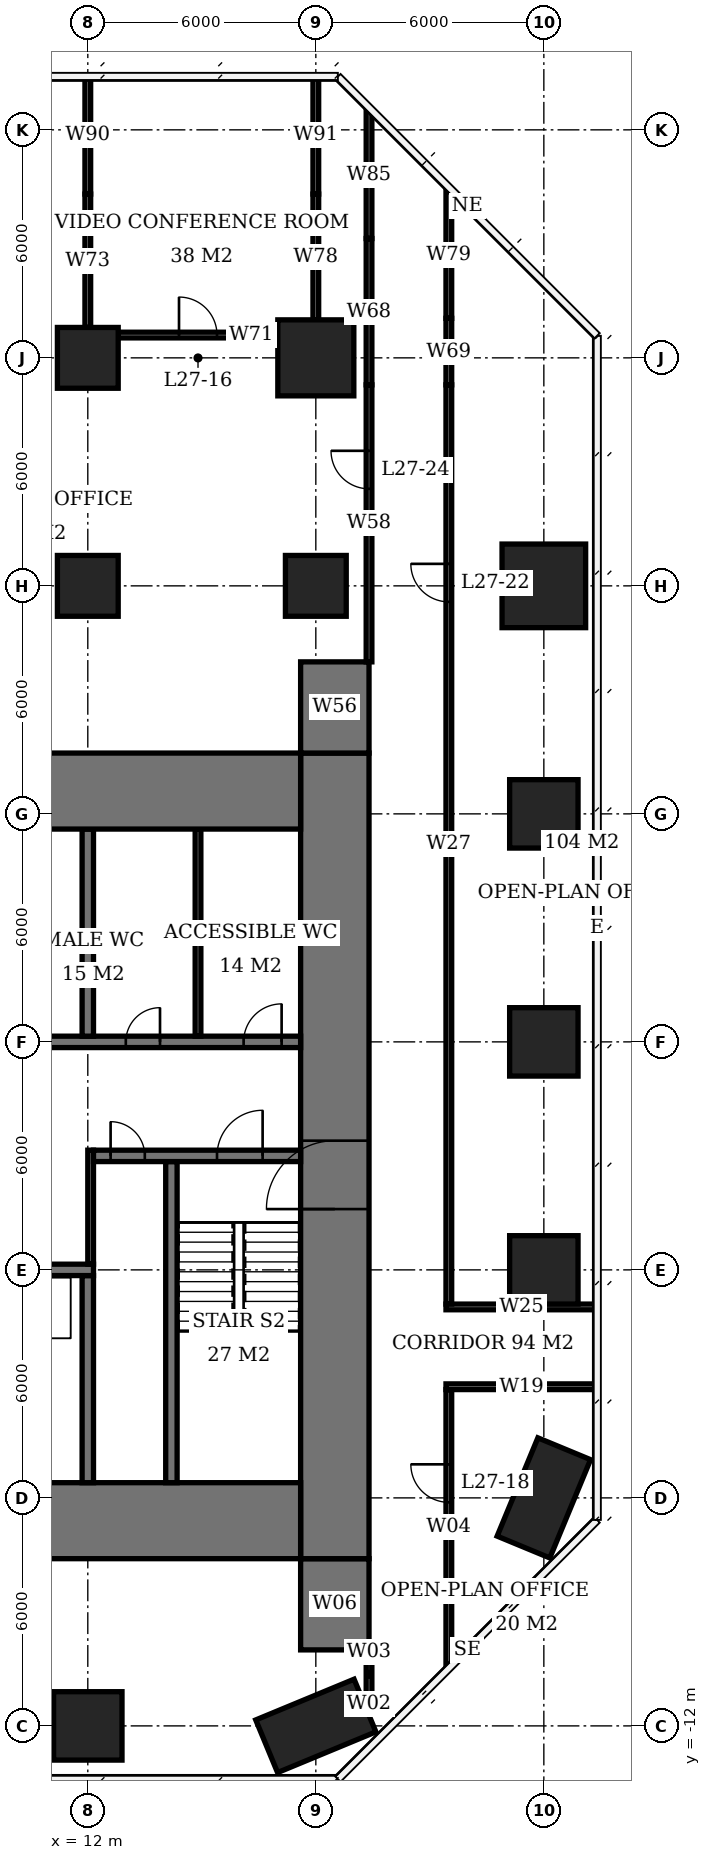
"""IFC4 building model, lengths in metres.
Left out: names, types, materials, properties, quantities, classifications, styles, units other than length and angle.
Written with IfcOpenShell. Run it as: python <this file> out.ifc"""

import sys

from ifc_helpers import new_model, si_unit, direction, frame, frame_2d, origin, origin_2d, place, context, subcontext, project, spatial, rectangle, extrude, element, fill, save


model = new_model("IFC4")
c1 = context("Model", 3, precision=1e-05, world=origin(), true_north=direction((0.0, 1.0)))
c2 = subcontext(c1, "Body", "Model", "MODEL_VIEW")
j1 = project(units=[si_unit("LENGTHUNIT", "METRE"), si_unit("PLANEANGLEUNIT", "RADIAN")], contexts=[c1])
p1 = place(None, origin())
s1 = spatial("IfcSite", under=j1, at=p1, CompositionType="ELEMENT")
p2 = place(p1, origin())
s2 = spatial("IfcBuilding", under=s1, at=p2, CompositionType="ELEMENT")
p3 = place(p2, frame((0.0, 0.0, 113.3)))
s3 = spatial("IfcBuildingStorey", under=s2, at=p3, CompositionType="ELEMENT", Elevation=113.3)
p4 = place(p3, frame((12.0, -12.0, 0.0), z_axis=(0.0, 0.0, 1.0), x_axis=(1.0, 0.0, 0.0)))
e1 = element("IfcColumn", 1, at=p4, inside=s3, PredefinedType="COLUMN", context=c2, shape_type="SweptSolid", body=[
    extrude(rectangle(XDim=1.8, YDim=1.8, at=origin_2d()), origin(), (0.0, 0.0, 1.0), 3.9),
])
for number, where, z_axis, x_axis in (
    (2, (12.0, 18.0, 0.0), (0.0, 0.0, 1.0), (1.0, 0.0, 0.0)),
    (3, (12.0, 24.0, 0.0), (0.0, 0.0, 1.0), (1.0, 0.0, 0.0)),
):
    element("IfcColumn", number, at=place(p3, frame(where, z_axis=z_axis, x_axis=x_axis)), inside=s3, PredefinedType="COLUMN", context=c2, shape_type="SweptSolid", body=[
        extrude(rectangle(XDim=1.6, YDim=1.6, at=origin_2d()), origin(), (0.0, 0.0, 1.0), 3.9),
    ])
p5 = place(p3, frame((18.0, -12.0, 0.0), z_axis=(0.0, 0.0, 1.0), x_axis=(-0.923879532511, -0.382683432365, 0.0)))
e4 = element("IfcColumn", 4, at=p5, inside=s3, PredefinedType="COLUMN", context=c2, shape_type="SweptSolid", body=[
    extrude(rectangle(XDim=2.8, YDim=1.5, at=origin_2d()), origin(), (0.0, 0.0, 1.0), 3.9),
])
p6 = place(p3, frame((18.0, 18.0, 0.0), z_axis=(0.0, 0.0, 1.0), x_axis=(1.0, 0.0, 0.0)))
e5 = element("IfcColumn", 5, at=p6, inside=s3, PredefinedType="COLUMN", context=c2, shape_type="SweptSolid", body=[
    extrude(rectangle(XDim=1.6, YDim=1.6, at=origin_2d()), origin(), (0.0, 0.0, 1.0), 3.9),
])
p7 = place(p3, frame((18.0, 24.0, 0.0), z_axis=(0.0, 0.0, 1.0), x_axis=(1.0, 0.0, 0.0)))
e6 = element("IfcColumn", 6, at=p7, inside=s3, PredefinedType="COLUMN", context=c2, shape_type="SweptSolid", body=[
    extrude(rectangle(XDim=2.0, YDim=2.0, at=origin_2d()), origin(), (0.0, 0.0, 1.0), 3.9),
])
p8 = place(p3, frame((24.0, -6.0, 0.0), z_axis=(0.0, 0.0, 1.0), x_axis=(-0.382683432365, -0.923879532511, 0.0)))
e7 = element("IfcColumn", 7, at=p8, inside=s3, PredefinedType="COLUMN", context=c2, shape_type="SweptSolid", body=[
    extrude(rectangle(XDim=2.8, YDim=1.5, at=origin_2d()), origin(), (0.0, 0.0, 1.0), 3.9),
])
for number, where, z_axis, x_axis in (
    (8, (24.0, 0.0, 0.0), (0.0, 0.0, 1.0), (1.0, 0.0, 0.0)),
    (9, (24.0, 6.0, 0.0), (0.0, 0.0, 1.0), (1.0, 0.0, 0.0)),
    (10, (24.0, 12.0, 0.0), (0.0, 0.0, 1.0), (1.0, 0.0, 0.0)),
):
    element("IfcColumn", number, at=place(p3, frame(where, z_axis=z_axis, x_axis=x_axis)), inside=s3, PredefinedType="COLUMN", context=c2, shape_type="SweptSolid", body=[
        extrude(rectangle(XDim=1.8, YDim=1.8, at=origin_2d()), origin(), (0.0, 0.0, 1.0), 3.9),
    ])
p9 = place(p3, frame((24.0, 18.0, 0.0), z_axis=(0.0, 0.0, 1.0), x_axis=(1.0, 0.0, 0.0)))
e11 = element("IfcColumn", 11, at=p9, inside=s3, PredefinedType="COLUMN", context=c2, shape_type="SweptSolid", body=[
    extrude(rectangle(XDim=2.2, YDim=2.2, at=origin_2d()), origin(), (0.0, 0.0, 1.0), 3.9),
])
for number, where, z_axis, x_axis in (
    (12, (-5.6, -6.6, 0.0), (0.0, 0.0, 1.0), (1.0, 0.0, 0.0)),
    (13, (-5.6, 12.6, 0.0), (0.0, 0.0, 1.0), (1.0, 0.0, 0.0)),
):
    element("IfcWall", number, at=place(p3, frame(where, z_axis=z_axis, x_axis=x_axis)), inside=s3, PredefinedType="SHEAR", context=c2, shape_type="SweptSolid", body=[
        extrude(rectangle(XDim=23.2, YDim=2.0, at=frame_2d((11.6, 0.0))), origin(), (0.0, 0.0, 1.0), 3.9),
    ])
p10 = place(p3, frame((18.5, -7.6, 0.0), z_axis=(0.0, 0.0, 1.0), x_axis=(0.0, 1.0, 0.0)))
e14 = element("IfcWall", 14, at=p10, inside=s3, PredefinedType="SHEAR", context=c2, shape_type="SweptSolid", body=[
    extrude(rectangle(XDim=21.2, YDim=1.8, at=frame_2d((10.6, 0.0))), origin(), (0.0, 0.0, 1.0), 3.9),
])
p11 = place(p10, frame((9.2, 0.0, 0.0)))
e15 = element("IfcOpeningElement", 15, at=p11, cuts=e14, PredefinedType="OPENING", context=c2, shape_type="SweptSolid", body=[
    extrude(rectangle(XDim=1.8, YDim=2.4, at=frame_2d((0.9, 1.2))), frame((0.0, 0.91, 0.0), z_axis=(0.0, -1.0, 0.0), x_axis=(1.0, 0.0, 0.0)), (0.0, 0.0, 1.0), 1.82),
])
for number, where, z_axis, x_axis in (
    (16, (18.5, -10.0, 0.0), (0.0, 0.0, 1.0), (0.0, 1.0, 0.0)),
    (17, (18.5, 13.6, 0.0), (0.0, 0.0, 1.0), (0.0, 1.0, 0.0)),
):
    element("IfcWall", number, at=place(p3, frame(where, z_axis=z_axis, x_axis=x_axis)), inside=s3, PredefinedType="SHEAR", context=c2, shape_type="SweptSolid", body=[
        extrude(rectangle(XDim=2.4, YDim=1.8, at=frame_2d((1.2, 0.0))), origin(), (0.0, 0.0, 1.0), 3.9),
    ])
p12 = place(p3, frame((-5.6, 0.0, 0.0), z_axis=(0.0, 0.0, 1.0), x_axis=(1.0, 0.0, 0.0)))
e18 = element("IfcWall", 18, at=p12, inside=s3, PredefinedType="SHEAR", context=c2, shape_type="SweptSolid", body=[
    extrude(rectangle(XDim=17.75, YDim=0.3, at=frame_2d((8.875, 0.0))), origin(), (0.0, 0.0, 1.0), 3.9),
])
p13 = place(p12, frame((0.6, 0.0, 0.0)))
e19 = element("IfcOpeningElement", 19, at=p13, cuts=e18, PredefinedType="OPENING", context=c2, shape_type="SweptSolid", body=[
    extrude(rectangle(XDim=0.9, YDim=2.1, at=frame_2d((0.45, 1.05))), frame((0.0, 0.16, 0.0), z_axis=(0.0, -1.0, 0.0), x_axis=(1.0, 0.0, 0.0)), (0.0, 0.0, 1.0), 0.32),
])
p14 = place(p12, frame((6.55, 0.0, 0.0)))
e20 = element("IfcOpeningElement", 20, at=p14, cuts=e18, PredefinedType="OPENING", context=c2, shape_type="SweptSolid", body=[
    extrude(rectangle(XDim=1.1, YDim=2.1, at=frame_2d((0.55, 1.05))), frame((0.0, 0.16, 0.0), z_axis=(0.0, -1.0, 0.0), x_axis=(1.0, 0.0, 0.0)), (0.0, 0.0, 1.0), 0.32),
])
p15 = place(p12, frame((9.55, 0.0, 0.0)))
e21 = element("IfcOpeningElement", 21, at=p15, cuts=e18, PredefinedType="OPENING", context=c2, shape_type="SweptSolid", body=[
    extrude(rectangle(XDim=1.1, YDim=2.1, at=frame_2d((0.55, 1.05))), frame((0.0, 0.16, 0.0), z_axis=(0.0, -1.0, 0.0), x_axis=(1.0, 0.0, 0.0)), (0.0, 0.0, 1.0), 0.32),
])
p16 = place(p3, frame((12.15, 3.0, 0.0), z_axis=(0.0, 0.0, 1.0), x_axis=(1.0, 0.0, 0.0)))
e22 = element("IfcWall", 22, at=p16, inside=s3, PredefinedType="SHEAR", context=c2, shape_type="SweptSolid", body=[
    extrude(rectangle(XDim=5.45, YDim=0.3, at=frame_2d((2.725, 0.0))), origin(), (0.0, 0.0, 1.0), 3.9),
])
p17 = place(p16, frame((3.25, 0.0, 0.0)))
e23 = element("IfcOpeningElement", 23, at=p17, cuts=e22, PredefinedType="OPENING", context=c2, shape_type="SweptSolid", body=[
    extrude(rectangle(XDim=1.2, YDim=2.1, at=frame_2d((0.6, 1.05))), frame((0.0, 0.16, 0.0), z_axis=(0.0, -1.0, 0.0), x_axis=(1.0, 0.0, 0.0)), (0.0, 0.0, 1.0), 0.32),
])
p18 = place(p16, frame((0.45, 0.0, 0.0)))
e24 = element("IfcOpeningElement", 24, at=p18, cuts=e22, PredefinedType="OPENING", context=c2, shape_type="SweptSolid", body=[
    extrude(rectangle(XDim=0.9, YDim=2.1, at=frame_2d((0.45, 1.05))), frame((0.0, 0.16, 0.0), z_axis=(0.0, -1.0, 0.0), x_axis=(1.0, 0.0, 0.0)), (0.0, 0.0, 1.0), 0.32),
])
p19 = place(p3, frame((-0.15, 6.0, 0.0), z_axis=(0.0, 0.0, 1.0), x_axis=(1.0, 0.0, 0.0)))
e25 = element("IfcWall", 25, at=p19, inside=s3, PredefinedType="SHEAR", context=c2, shape_type="SweptSolid", body=[
    extrude(rectangle(XDim=17.75, YDim=0.3, at=frame_2d((8.875, 0.0))), origin(), (0.0, 0.0, 1.0), 3.9),
])
p20 = place(p19, frame((13.15, 0.0, 0.0)))
e26 = element("IfcOpeningElement", 26, at=p20, cuts=e25, PredefinedType="OPENING", context=c2, shape_type="SweptSolid", body=[
    extrude(rectangle(XDim=0.9, YDim=2.1, at=frame_2d((0.45, 1.05))), frame((0.0, 0.16, 0.0), z_axis=(0.0, -1.0, 0.0), x_axis=(1.0, 0.0, 0.0)), (0.0, 0.0, 1.0), 0.32),
])
p21 = place(p19, frame((16.25, 0.0, 0.0)))
e27 = element("IfcOpeningElement", 27, at=p21, cuts=e25, PredefinedType="OPENING", context=c2, shape_type="SweptSolid", body=[
    extrude(rectangle(XDim=1.0, YDim=2.1, at=frame_2d((0.5, 1.05))), frame((0.0, 0.16, 0.0), z_axis=(0.0, -1.0, 0.0), x_axis=(1.0, 0.0, 0.0)), (0.0, 0.0, 1.0), 0.32),
])
p22 = place(p19, frame((7.25, 0.0, 0.0)))
e28 = element("IfcOpeningElement", 28, at=p22, cuts=e25, PredefinedType="OPENING", context=c2, shape_type="SweptSolid", body=[
    extrude(rectangle(XDim=1.0, YDim=2.1, at=frame_2d((0.5, 1.05))), frame((0.0, 0.16, 0.0), z_axis=(0.0, -1.0, 0.0), x_axis=(1.0, 0.0, 0.0)), (0.0, 0.0, 1.0), 0.32),
])
p23 = place(p19, frame((1.1, 0.0, 0.0)))
e29 = element("IfcOpeningElement", 29, at=p23, cuts=e25, PredefinedType="OPENING", context=c2, shape_type="SweptSolid", body=[
    extrude(rectangle(XDim=1.1, YDim=2.1, at=frame_2d((0.55, 1.05))), frame((0.0, 0.16, 0.0), z_axis=(0.0, -1.0, 0.0), x_axis=(1.0, 0.0, 0.0)), (0.0, 0.0, 1.0), 0.32),
])
p24 = place(p19, frame((4.1, 0.0, 0.0)))
e30 = element("IfcOpeningElement", 30, at=p24, cuts=e25, PredefinedType="OPENING", context=c2, shape_type="SweptSolid", body=[
    extrude(rectangle(XDim=1.1, YDim=2.1, at=frame_2d((0.55, 1.05))), frame((0.0, 0.16, 0.0), z_axis=(0.0, -1.0, 0.0), x_axis=(1.0, 0.0, 0.0)), (0.0, 0.0, 1.0), 0.32),
])
for number, where, z_axis, x_axis in (
    (31, (12.0, -5.6, 0.0), (0.0, 0.0, 1.0), (0.0, 1.0, 0.0)),
    (32, (12.0, 6.15, 0.0), (0.0, 0.0, 1.0), (0.0, 1.0, 0.0)),
):
    element("IfcWall", number, at=place(p3, frame(where, z_axis=z_axis, x_axis=x_axis)), inside=s3, PredefinedType="SHEAR", context=c2, shape_type="SweptSolid", body=[
        extrude(rectangle(XDim=5.45, YDim=0.3, at=frame_2d((2.725, 0.0))), origin(), (0.0, 0.0, 1.0), 3.9),
    ])
p25 = place(p3, frame((14.2, -5.6, 0.0), z_axis=(0.0, 0.0, 1.0), x_axis=(0.0, 1.0, 0.0)))
e33 = element("IfcWall", 33, at=p25, inside=s3, PredefinedType="SHEAR", context=c2, shape_type="SweptSolid", body=[
    extrude(rectangle(XDim=8.45, YDim=0.3, at=frame_2d((4.225, 0.0))), origin(), (0.0, 0.0, 1.0), 3.9),
])
p26 = place(p3, frame((14.9, 6.15, 0.0), z_axis=(0.0, 0.0, 1.0), x_axis=(0.0, 1.0, 0.0)))
e34 = element("IfcWall", 34, at=p26, inside=s3, PredefinedType="PLUMBINGWALL", context=c2, shape_type="SweptSolid", body=[
    extrude(rectangle(XDim=5.45, YDim=0.15, at=frame_2d((2.725, 0.0))), origin(), (0.0, 0.0, 1.0), 3.65),
])
p27 = place(p3, frame((12.8, 24.6, 0.0), z_axis=(0.0, 0.0, 1.0), x_axis=(1.0, 0.0, 0.0)))
e35 = element("IfcWall", 35, at=p27, inside=s3, PredefinedType="PARTITIONING", context=c2, shape_type="SweptSolid", body=[
    extrude(rectangle(XDim=4.2, YDim=0.15, at=frame_2d((2.1, 0.0))), origin(), (0.0, 0.0, 1.0), 3.65),
])
p28 = place(p27, frame((1.6, 0.0, 0.0)))
e36 = element("IfcOpeningElement", 36, at=p28, cuts=e35, PredefinedType="OPENING", context=c2, shape_type="SweptSolid", body=[
    extrude(rectangle(XDim=1.0, YDim=2.1, at=frame_2d((0.5, 1.05))), frame((0.0, 0.085, 0.0), z_axis=(0.0, -1.0, 0.0), x_axis=(1.0, 0.0, 0.0)), (0.0, 0.0, 1.0), 0.17),
])
p29 = place(p3, frame((12.0, 24.8, 0.0), z_axis=(0.0, 0.0, 1.0), x_axis=(0.0, 1.0, 0.0)))
e37 = element("IfcWall", 37, at=p29, inside=s3, PredefinedType="PARTITIONING", context=c2, shape_type="SweptSolid", body=[
    extrude(rectangle(XDim=3.51, YDim=0.15, at=frame_2d((1.755, 0.0))), origin(), (0.0, 0.0, 1.0), 2.65),
])
p30 = place(p3, frame((12.0, 28.31, 0.0), z_axis=(0.0, 0.0, 1.0), x_axis=(0.0, 1.0, 0.0)))
e38 = element("IfcWall", 38, at=p30, inside=s3, PredefinedType="PARTITIONING", context=c2, shape_type="SweptSolid", body=[
    extrude(rectangle(XDim=3.09, YDim=0.15, at=frame_2d((1.545, 0.0))), origin(), (0.0, 0.0, 1.0), 3.65),
])
p31 = place(p3, frame((18.0, 25.0, 0.0), z_axis=(0.0, 0.0, 1.0), x_axis=(0.0, 1.0, 0.0)))
e39 = element("IfcWall", 39, at=p31, inside=s3, PredefinedType="PARTITIONING", context=c2, shape_type="SweptSolid", body=[
    extrude(rectangle(XDim=3.31, YDim=0.15, at=frame_2d((1.655, 0.0))), origin(), (0.0, 0.0, 1.0), 2.65),
])
p32 = place(p3, frame((18.0, 28.31, 0.0), z_axis=(0.0, 0.0, 1.0), x_axis=(0.0, 1.0, 0.0)))
e40 = element("IfcWall", 40, at=p32, inside=s3, PredefinedType="PARTITIONING", context=c2, shape_type="SweptSolid", body=[
    extrude(rectangle(XDim=3.09, YDim=0.15, at=frame_2d((1.545, 0.0))), origin(), (0.0, 0.0, 1.0), 3.65),
])
p33 = place(p3, frame((19.4, -11.541, 0.0), z_axis=(0.0, 0.0, 1.0), x_axis=(0.0, 1.0, 0.0)))
e41 = element("IfcWall", 41, at=p33, inside=s3, PredefinedType="PARTITIONING", context=c2, shape_type="SweptSolid", body=[
    extrude(rectangle(XDim=0.25, YDim=0.15, at=frame_2d((0.125, 0.0))), origin(), (0.0, 0.0, 1.0), 2.65),
])
p34 = place(p3, frame((19.4, -11.29, 0.0), z_axis=(0.0, 0.0, 1.0), x_axis=(0.0, 1.0, 0.0)))
e42 = element("IfcWall", 42, at=p34, inside=s3, PredefinedType="PARTITIONING", context=c2, shape_type="SweptSolid", body=[
    extrude(rectangle(XDim=1.29, YDim=0.15, at=frame_2d((0.645, 0.0))), origin(), (0.0, 0.0, 1.0), 3.65),
])
p35 = place(p3, frame((19.4, 16.0, 0.0), z_axis=(0.0, 0.0, 1.0), x_axis=(0.0, 1.0, 0.0)))
e43 = element("IfcWall", 43, at=p35, inside=s3, PredefinedType="PARTITIONING", context=c2, shape_type="SweptSolid", body=[
    extrude(rectangle(XDim=7.29, YDim=0.15, at=frame_2d((3.645, 0.0))), origin(), (0.0, 0.0, 1.0), 3.65),
])
p36 = place(p35, frame((4.554, 0.0, 0.0)))
e44 = element("IfcOpeningElement", 44, at=p36, cuts=e43, PredefinedType="OPENING", context=c2, shape_type="SweptSolid", body=[
    extrude(rectangle(XDim=1.0, YDim=2.1, at=frame_2d((0.5, 1.05))), frame((0.0, 0.085, 0.0), z_axis=(0.0, -1.0, 0.0), x_axis=(1.0, 0.0, 0.0)), (0.0, 0.0, 1.0), 0.17),
])
p37 = place(p3, frame((19.4, 23.29, 0.0), z_axis=(0.0, 0.0, 1.0), x_axis=(0.0, 1.0, 0.0)))
e45 = element("IfcWall", 45, at=p37, inside=s3, PredefinedType="PARTITIONING", context=c2, shape_type="SweptSolid", body=[
    extrude(rectangle(XDim=3.85, YDim=0.15, at=frame_2d((1.925, 0.0))), origin(), (0.0, 0.0, 1.0), 2.65),
])
p38 = place(p3, frame((19.4, 27.14, 0.0), z_axis=(0.0, 0.0, 1.0), x_axis=(0.0, 1.0, 0.0)))
e46 = element("IfcWall", 46, at=p38, inside=s3, PredefinedType="PARTITIONING", context=c2, shape_type="SweptSolid", body=[
    extrude(rectangle(XDim=3.349, YDim=0.15, at=frame_2d((1.675, 0.0))), origin(), (0.0, 0.0, 1.0), 3.65),
])
p39 = place(p3, frame((21.5, -10.388, 0.0), z_axis=(0.0, 0.0, 1.0), x_axis=(0.0, 1.0, 0.0)))
e47 = element("IfcWall", 47, at=p39, inside=s3, PredefinedType="PARTITIONING", context=c2, shape_type="SweptSolid", body=[
    extrude(rectangle(XDim=7.238, YDim=0.15, at=frame_2d((3.619, 0.0))), origin(), (0.0, 0.0, 1.0), 3.65),
])
p40 = place(p39, frame((4.271, 0.0, 0.0)))
e48 = element("IfcOpeningElement", 48, at=p40, cuts=e47, PredefinedType="OPENING", context=c2, shape_type="SweptSolid", body=[
    extrude(rectangle(XDim=1.0, YDim=2.1, at=frame_2d((0.5, 1.05))), frame((0.0, 0.085, 0.0), z_axis=(0.0, -1.0, 0.0), x_axis=(1.0, 0.0, 0.0)), (0.0, 0.0, 1.0), 0.17),
])
p41 = place(p3, frame((21.425, -3.075, 0.0), z_axis=(0.0, 0.0, 1.0), x_axis=(1.0, 0.0, 0.0)))
e49 = element("IfcWall", 49, at=p41, inside=s3, PredefinedType="PARTITIONING", context=c2, shape_type="SweptSolid", body=[
    extrude(rectangle(XDim=3.975, YDim=0.15, at=frame_2d((1.987, 0.0))), origin(), (0.0, 0.0, 1.0), 3.65),
])
p42 = place(p3, frame((21.5, -0.9, 0.0), z_axis=(0.0, 0.0, 1.0), x_axis=(0.0, 1.0, 0.0)))
e50 = element("IfcWall", 50, at=p42, inside=s3, PredefinedType="PARTITIONING", context=c2, shape_type="SweptSolid", body=[
    extrude(rectangle(XDim=24.19, YDim=0.15, at=frame_2d((12.095, 0.0))), origin(), (0.0, 0.0, 1.0), 3.65),
])
p43 = place(p42, frame((18.479, 0.0, 0.0)))
e51 = element("IfcOpeningElement", 51, at=p43, cuts=e50, PredefinedType="OPENING", context=c2, shape_type="SweptSolid", body=[
    extrude(rectangle(XDim=1.0, YDim=2.1, at=frame_2d((0.5, 1.05))), frame((0.0, 0.085, 0.0), z_axis=(0.0, -1.0, 0.0), x_axis=(1.0, 0.0, 0.0)), (0.0, 0.0, 1.0), 0.17),
])
p44 = place(p3, frame((21.5, 23.29, 0.0), z_axis=(0.0, 0.0, 1.0), x_axis=(0.0, 1.0, 0.0)))
e52 = element("IfcWall", 52, at=p44, inside=s3, PredefinedType="PARTITIONING", context=c2, shape_type="SweptSolid", body=[
    extrude(rectangle(XDim=1.75, YDim=0.15, at=frame_2d((0.875, 0.0))), origin(), (0.0, 0.0, 1.0), 2.65),
])
p45 = place(p3, frame((21.5, 25.04, 0.0), z_axis=(0.0, 0.0, 1.0), x_axis=(0.0, 1.0, 0.0)))
e53 = element("IfcWall", 53, at=p45, inside=s3, PredefinedType="PARTITIONING", context=c2, shape_type="SweptSolid", body=[
    extrude(rectangle(XDim=3.348, YDim=0.15, at=frame_2d((1.674, 0.0))), origin(), (0.0, 0.0, 1.0), 3.65),
])
p46 = place(p3, frame((21.425, -0.975, 0.0), z_axis=(0.0, 0.0, 1.0), x_axis=(1.0, 0.0, 0.0)))
e54 = element("IfcWall", 54, at=p46, inside=s3, PredefinedType="PARTITIONING", context=c2, shape_type="SweptSolid", body=[
    extrude(rectangle(XDim=3.975, YDim=0.15, at=frame_2d((1.987, 0.0))), origin(), (0.0, 0.0, 1.0), 3.65),
])
p47 = place(p3, frame((12.075, 0.15, 0.0), z_axis=(0.0, 0.0, 1.0), x_axis=(0.0, 1.0, 0.0)))
e55 = element("IfcWall", 55, at=p47, inside=s3, PredefinedType="PARTITIONING", context=c2, shape_type="SweptSolid", body=[
    extrude(rectangle(XDim=3.0, YDim=0.15, at=frame_2d((1.5, 0.0))), origin(), (0.0, 0.0, 1.0), 3.65),
])
p48 = place(p11, origin())
e56 = element("IfcDoor", 56, at=p48, inside=s3, OperationType="DOUBLE_DOOR_SINGLE_SWING", PredefinedType="DOOR", context=c2, shape_type="SweptSolid", body=[
    extrude(rectangle(XDim=1.8, YDim=2.4, at=frame_2d((0.9, 1.2))), frame((0.0, 0.025, 0.0), z_axis=(0.0, -1.0, 0.0), x_axis=(1.0, 0.0, 0.0)), (0.0, 0.0, 1.0), 0.05),
])
fill(e15, e56)
p49 = place(p17, origin())
e57 = element("IfcDoor", 57, at=p49, inside=s3, OperationType="SINGLE_SWING_RIGHT", PredefinedType="DOOR", context=c2, shape_type="SweptSolid", body=[
    extrude(rectangle(XDim=1.2, YDim=2.1, at=frame_2d((0.6, 1.05))), frame((0.0, 0.025, 0.0), z_axis=(0.0, -1.0, 0.0), x_axis=(1.0, 0.0, 0.0)), (0.0, 0.0, 1.0), 0.05),
])
fill(e23, e57)
p50 = place(p18, origin())
e58 = element("IfcDoor", 58, at=p50, inside=s3, OperationType="SINGLE_SWING_LEFT", PredefinedType="DOOR", context=c2, shape_type="SweptSolid", body=[
    extrude(rectangle(XDim=0.9, YDim=2.1, at=frame_2d((0.45, 1.05))), frame((0.0, 0.025, 0.0), z_axis=(0.0, -1.0, 0.0), x_axis=(1.0, 0.0, 0.0)), (0.0, 0.0, 1.0), 0.05),
])
fill(e24, e58)
p51 = place(p20, origin())
e59 = element("IfcDoor", 59, at=p51, inside=s3, OperationType="SINGLE_SWING_RIGHT", PredefinedType="DOOR", context=c2, shape_type="SweptSolid", body=[
    extrude(rectangle(XDim=0.9, YDim=2.1, at=frame_2d((0.45, 1.05))), frame((0.0, 0.025, 0.0), z_axis=(0.0, -1.0, 0.0), x_axis=(1.0, 0.0, 0.0)), (0.0, 0.0, 1.0), 0.05),
])
fill(e26, e59)
p52 = place(p21, origin())
e60 = element("IfcDoor", 60, at=p52, inside=s3, OperationType="SINGLE_SWING_RIGHT", PredefinedType="DOOR", context=c2, shape_type="SweptSolid", body=[
    extrude(rectangle(XDim=1.0, YDim=2.1, at=frame_2d((0.5, 1.05))), frame((0.0, 0.025, 0.0), z_axis=(0.0, -1.0, 0.0), x_axis=(1.0, 0.0, 0.0)), (0.0, 0.0, 1.0), 0.05),
])
fill(e27, e60)
p53 = place(p28, origin())
e61 = element("IfcDoor", 61, at=p53, inside=s3, OperationType="SINGLE_SWING_LEFT", PredefinedType="DOOR", context=c2, shape_type="SweptSolid", body=[
    extrude(rectangle(XDim=1.0, YDim=2.1, at=frame_2d((0.5, 1.05))), frame((0.0, 0.025, 0.0), z_axis=(0.0, -1.0, 0.0), x_axis=(1.0, 0.0, 0.0)), (0.0, 0.0, 1.0), 0.05),
])
fill(e36, e61)
p54 = place(p40, origin())
e62 = element("IfcDoor", 62, at=p54, inside=s3, OperationType="SINGLE_SWING_RIGHT", PredefinedType="DOOR", context=c2, shape_type="SweptSolid", body=[
    extrude(rectangle(XDim=1.0, YDim=2.1, at=frame_2d((0.5, 1.05))), frame((0.0, 0.025, 0.0), z_axis=(0.0, -1.0, 0.0), x_axis=(1.0, 0.0, 0.0)), (0.0, 0.0, 1.0), 0.05),
])
fill(e48, e62)
p55 = place(p43, origin())
e63 = element("IfcDoor", 63, at=p55, inside=s3, OperationType="SINGLE_SWING_RIGHT", PredefinedType="DOOR", context=c2, shape_type="SweptSolid", body=[
    extrude(rectangle(XDim=1.0, YDim=2.1, at=frame_2d((0.5, 1.05))), frame((0.0, 0.025, 0.0), z_axis=(0.0, -1.0, 0.0), x_axis=(1.0, 0.0, 0.0)), (0.0, 0.0, 1.0), 0.05),
])
fill(e51, e63)
p56 = place(p36, origin())
e64 = element("IfcDoor", 64, at=p56, inside=s3, OperationType="SINGLE_SWING_RIGHT", PredefinedType="DOOR", context=c2, shape_type="SweptSolid", body=[
    extrude(rectangle(XDim=1.0, YDim=2.1, at=frame_2d((0.5, 1.05))), frame((0.0, 0.025, 0.0), z_axis=(0.0, -1.0, 0.0), x_axis=(1.0, 0.0, 0.0)), (0.0, 0.0, 1.0), 0.05),
])
fill(e44, e64)
save(model, sys.argv[1])
